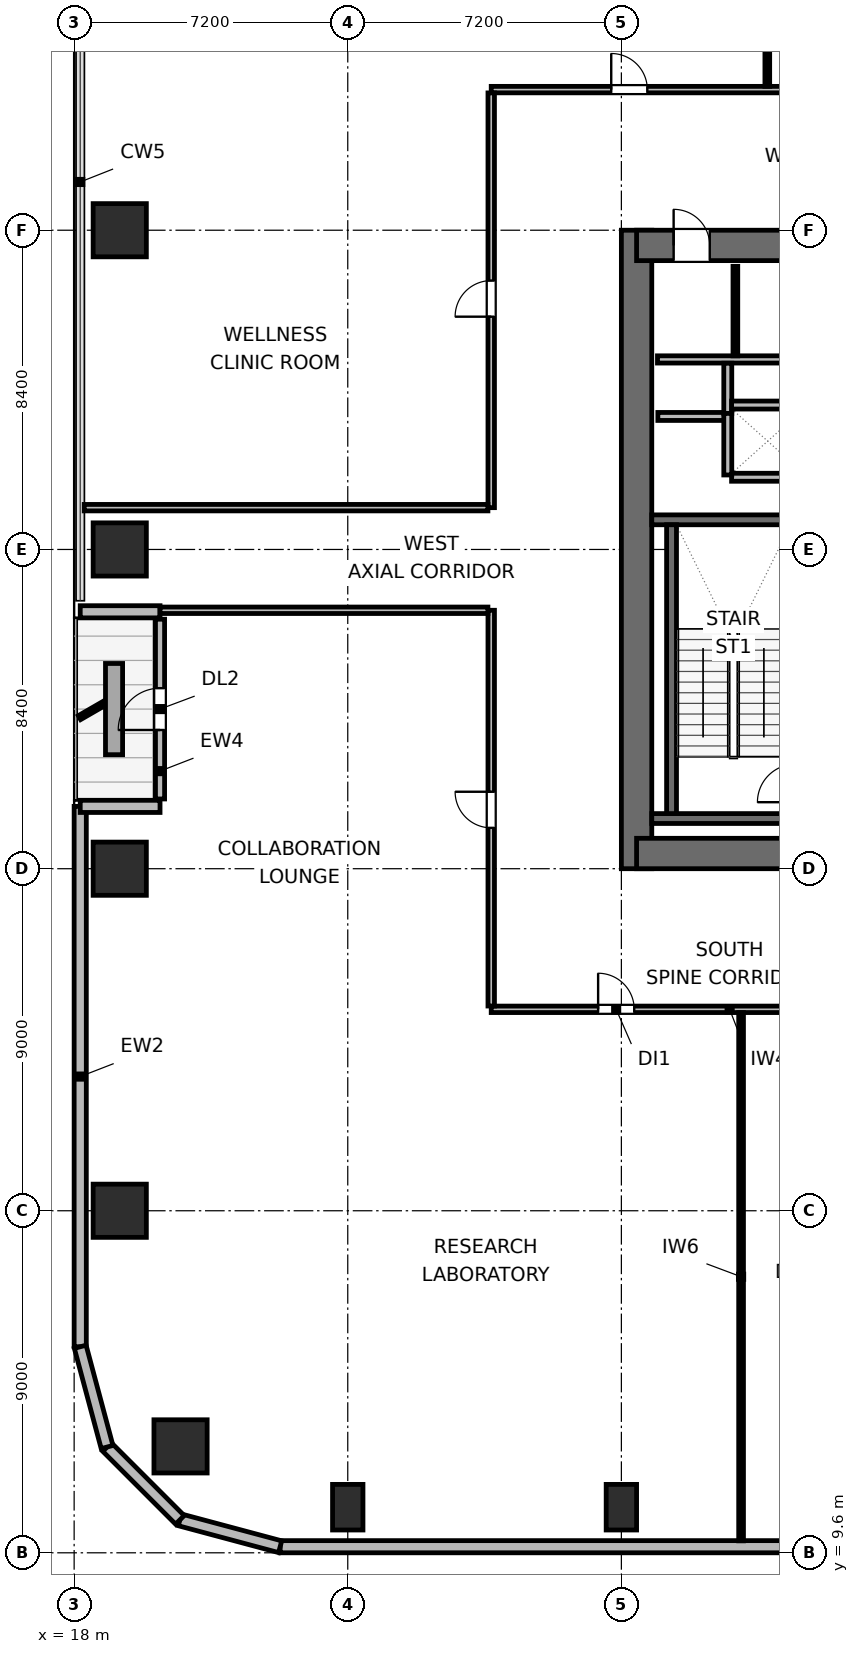
"""IFC4 building model, lengths in metres.
Left out: names, types, materials, properties, quantities, classifications, styles, units other than length and angle.
Written with IfcOpenShell. Run it as: python <this file> out.ifc"""

import sys

from ifc_helpers import new_model, si_unit, direction, frame, frame_2d, origin, origin_2d, place, context, subcontext, project, spatial, rectangle, circle, extrude, element, fill, save


model = new_model("IFC4")
c1 = context("Model", 3, precision=1e-05, world=origin(), true_north=direction((0.0, 1.0)))
c2 = subcontext(c1, "Body", "Model", "MODEL_VIEW")
j1 = project(units=[si_unit("LENGTHUNIT", "METRE"), si_unit("PLANEANGLEUNIT", "RADIAN")], contexts=[c1])
p1 = place(None, origin())
s1 = spatial("IfcSite", under=j1, at=p1, CompositionType="ELEMENT")
p2 = place(p1, origin())
s2 = spatial("IfcBuilding", under=s1, at=p2, CompositionType="ELEMENT")
p3 = place(p2, frame((0.0, 0.0, 125.4)))
s3 = spatial("IfcBuildingStorey", under=s2, at=p3, CompositionType="ELEMENT", Elevation=125.4)
p4 = place(p3, frame((32.8, 27.6, 0.0), z_axis=(0.0, 0.0, 1.0), x_axis=(0.0, 1.0, 0.0)))
e1 = element("IfcWall", 1, at=p4, inside=s3, PredefinedType="SHEAR", context=c2, shape_type="SweptSolid", body=[
    extrude(rectangle(XDim=16.8, YDim=0.8, at=frame_2d((8.4, 0.0))), origin(), (0.0, 0.0, 1.0), 4.5),
])
p5 = place(p3, frame((32.8, 28.0, 0.0), z_axis=(0.0, 0.0, 1.0), x_axis=(1.0, 0.0, 0.0)))
e2 = element("IfcWall", 2, at=p5, inside=s3, PredefinedType="SHEAR", context=c2, shape_type="SweptSolid", body=[
    extrude(rectangle(XDim=9.2, YDim=0.8, at=frame_2d((4.6, 0.0))), origin(), (0.0, 0.0, 1.0), 4.5),
])
p6 = place(p5, frame((4.975, 0.0, 0.0)))
e3 = element("IfcOpeningElement", 3, at=p6, cuts=e2, PredefinedType="OPENING", context=c2, shape_type="SweptSolid", body=[
    extrude(rectangle(XDim=1.05, YDim=2.04, at=frame_2d((0.525, 1.02))), frame((0.0, 0.41, 0.0), z_axis=(0.0, -1.0, 0.0), x_axis=(1.0, 0.0, 0.0)), (0.0, 0.0, 1.0), 0.82),
])
p7 = place(p3, frame((32.8, 44.0, 0.0), z_axis=(0.0, 0.0, 1.0), x_axis=(1.0, 0.0, 0.0)))
e4 = element("IfcWall", 4, at=p7, inside=s3, PredefinedType="SHEAR", context=c2, shape_type="SweptSolid", body=[
    extrude(rectangle(XDim=9.2, YDim=0.8, at=frame_2d((4.6, 0.0))), origin(), (0.0, 0.0, 1.0), 4.5),
])
p8 = place(p7, frame((0.975, 0.0, 0.0)))
e5 = element("IfcOpeningElement", 5, at=p8, cuts=e4, PredefinedType="OPENING", context=c2, shape_type="SweptSolid", body=[
    extrude(rectangle(XDim=0.95, YDim=2.04, at=frame_2d((0.475, 1.02))), frame((0.0, 0.41, 0.0), z_axis=(0.0, -1.0, 0.0), x_axis=(1.0, 0.0, 0.0)), (0.0, 0.0, 1.0), 0.82),
])
p9 = place(p7, frame((4.225, 0.0, 0.0)))
e6 = element("IfcOpeningElement", 6, at=p9, cuts=e4, PredefinedType="OPENING", context=c2, shape_type="SweptSolid", body=[
    extrude(rectangle(XDim=0.9, YDim=2.02, at=frame_2d((0.45, 1.01))), frame((0.0, 0.41, 0.0), z_axis=(0.0, -1.0, 0.0), x_axis=(1.0, 0.0, 0.0)), (0.0, 0.0, 1.0), 0.82),
])
p10 = place(p7, frame((7.125, 0.0, 0.0)))
e7 = element("IfcOpeningElement", 7, at=p10, cuts=e4, PredefinedType="OPENING", context=c2, shape_type="SweptSolid", body=[
    extrude(rectangle(XDim=0.9, YDim=2.02, at=frame_2d((0.45, 1.01))), frame((0.0, 0.41, 0.0), z_axis=(0.0, -1.0, 0.0), x_axis=(1.0, 0.0, 0.0)), (0.0, 0.0, 1.0), 0.82),
])
for number, where, z_axis, x_axis in (
    (8, (33.2, 28.92, 0.0), (0.0, 0.0, 1.0), (1.0, 0.0, 0.0)),
    (9, (33.2, 36.78, 0.0), (0.0, 0.0, 1.0), (1.0, 0.0, 0.0)),
):
    element("IfcWall", number, at=place(p3, frame(where, z_axis=z_axis, x_axis=x_axis)), inside=s3, PredefinedType="SHEAR", context=c2, shape_type="SweptSolid", body=[
        extrude(rectangle(XDim=3.91, YDim=0.26, at=frame_2d((1.955, 0.0))), origin(), (0.0, 0.0, 1.0), 4.5),
    ])
p11 = place(p3, frame((33.72, 29.05, 0.0), z_axis=(0.0, 0.0, 1.0), x_axis=(0.0, 1.0, 0.0)))
e10 = element("IfcWall", 10, at=p11, inside=s3, PredefinedType="SHEAR", context=c2, shape_type="SweptSolid", body=[
    extrude(rectangle(XDim=7.6, YDim=0.26, at=frame_2d((3.8, 0.0))), origin(), (0.0, 0.0, 1.0), 4.5),
])
p12 = place(p3, frame((20.8, 12.4, 0.0), z_axis=(0.0, 0.0, 1.0), x_axis=(1.0, 0.0, 0.0)))
e11 = element("IfcColumn", 11, at=p12, inside=s3, PredefinedType="COLUMN", context=c2, shape_type="SweptSolid", body=[
    extrude(circle(Radius=0.7, at=origin_2d()), origin(), (0.0, 0.0, 1.0), 4.5),
])
for number, where, z_axis, x_axis in (
    (12, (25.2, 10.8, 0.0), (0.0, 0.0, 1.0), (1.0, 0.0, 0.0)),
    (13, (32.4, 10.8, 0.0), (0.0, 0.0, 1.0), (1.0, 0.0, 0.0)),
):
    element("IfcColumn", number, at=place(p3, frame(where, z_axis=z_axis, x_axis=x_axis)), inside=s3, PredefinedType="COLUMN", context=c2, shape_type="SweptSolid", body=[
        extrude(rectangle(XDim=0.8, YDim=1.2, at=origin_2d()), origin(), (0.0, 0.0, 1.0), 4.5),
    ])
for number, where, z_axis, x_axis in (
    (14, (19.2, 18.6, 0.0), (0.0, 0.0, 1.0), (1.0, 0.0, 0.0)),
    (15, (19.2, 27.6, 0.0), (0.0, 0.0, 1.0), (1.0, 0.0, 0.0)),
    (16, (19.2, 36.0, 0.0), (0.0, 0.0, 1.0), (1.0, 0.0, 0.0)),
    (17, (19.2, 44.4, 0.0), (0.0, 0.0, 1.0), (1.0, 0.0, 0.0)),
):
    element("IfcColumn", number, at=place(p3, frame(where, z_axis=z_axis, x_axis=x_axis)), inside=s3, PredefinedType="COLUMN", context=c2, shape_type="SweptSolid", body=[
        extrude(rectangle(XDim=1.4, YDim=1.4, at=origin_2d()), origin(), (0.0, 0.0, 1.0), 4.5),
    ])
p13 = place(p3, frame((18.16, 15.021, 0.0), z_axis=(0.0, 0.0, 1.0), x_axis=(0.0, 1.0, 0.0)))
e18 = element("IfcWall", 18, at=p13, inside=s3, PredefinedType="SOLIDWALL", context=c2, shape_type="SweptSolid", body=[
    extrude(rectangle(XDim=14.219, YDim=0.32, at=frame_2d((7.109, 0.0))), origin(), (0.0, 0.0, 1.0), 4.24),
])
p14 = place(p3, frame((18.16, 29.24, 0.0), z_axis=(0.0, 0.0, 1.0), x_axis=(1.0, 0.0, 0.0)))
e19 = element("IfcWall", 19, at=p14, inside=s3, PredefinedType="SOLIDWALL", context=c2, shape_type="SweptSolid", body=[
    extrude(rectangle(XDim=2.1, YDim=0.32, at=frame_2d((1.05, 0.0))), origin(), (0.0, 0.0, 1.0), 3.475),
])
p15 = place(p3, frame((20.26, 29.435, 0.0), z_axis=(0.0, 0.0, 1.0), x_axis=(0.0, 1.0, 0.0)))
e20 = element("IfcWall", 20, at=p15, inside=s3, PredefinedType="SOLIDWALL", context=c2, shape_type="SweptSolid", body=[
    extrude(rectangle(XDim=4.73, YDim=0.24, at=frame_2d((2.365, 0.0))), origin(), (0.0, 0.0, 1.0), 3.762),
])
p16 = place(p15, frame((1.815, 0.0, 0.0)))
e21 = element("IfcOpeningElement", 21, at=p16, cuts=e20, PredefinedType="OPENING", context=c2, shape_type="SweptSolid", body=[
    extrude(rectangle(XDim=1.1, YDim=2.04, at=frame_2d((0.55, 1.02))), frame((0.0, 0.13, 0.0), z_axis=(0.0, -1.0, 0.0), x_axis=(1.0, 0.0, 0.0)), (0.0, 0.0, 1.0), 0.26),
])
p17 = place(p3, frame((20.26, 34.36, 0.0), z_axis=(0.0, 0.0, 1.0), x_axis=(-1.0, 0.0, 0.0)))
e22 = element("IfcWall", 22, at=p17, inside=s3, PredefinedType="SOLIDWALL", context=c2, shape_type="SweptSolid", body=[
    extrude(rectangle(XDim=2.1, YDim=0.32, at=frame_2d((1.05, 0.0))), origin(), (0.0, 0.0, 1.0), 3.475),
])
p18 = place(p3, frame((41.355, 9.76, 0.0), z_axis=(0.0, 0.0, 1.0), x_axis=(-1.0, 0.0, 0.0)))
e23 = element("IfcWall", 23, at=p18, inside=s3, PredefinedType="SOLIDWALL", context=c2, shape_type="SweptSolid", body=[
    extrude(rectangle(XDim=17.934, YDim=0.32, at=frame_2d((8.967, 0.0))), origin(), (0.0, 0.0, 1.0), 4.24),
])
p19 = place(p3, frame((23.421, 9.76, 0.0), z_axis=(0.0, 0.0, 1.0), x_axis=(-0.965964405026, 0.25867502435, 0.0)))
e24 = element("IfcWall", 24, at=p19, inside=s3, PredefinedType="SOLIDWALL", context=c2, shape_type="SweptSolid", body=[
    extrude(rectangle(XDim=2.731, YDim=0.32, at=frame_2d((1.366, 0.0))), origin(), (0.0, 0.0, 1.0), 4.24),
])
p20 = place(p3, frame((20.783, 10.467, 0.0), z_axis=(0.0, 0.0, 1.0), x_axis=(-0.707106781187, 0.707106781187, 0.0)))
e25 = element("IfcWall", 25, at=p20, inside=s3, PredefinedType="SOLIDWALL", context=c2, shape_type="SweptSolid", body=[
    extrude(rectangle(XDim=2.71, YDim=0.32, at=frame_2d((1.355, 0.0))), origin(), (0.0, 0.0, 1.0), 4.24),
])
p21 = place(p3, frame((18.866, 12.383, 0.0), z_axis=(0.0, 0.0, 1.0), x_axis=(-0.25869736047, 0.965958423373, 0.0)))
e26 = element("IfcWall", 26, at=p21, inside=s3, PredefinedType="SOLIDWALL", context=c2, shape_type="SweptSolid", body=[
    extrude(rectangle(XDim=2.731, YDim=0.32, at=frame_2d((1.366, 0.0))), origin(), (0.0, 0.0, 1.0), 4.24),
])
p22 = place(p3, frame((33.35, 41.0, 0.0), z_axis=(0.0, 0.0, 1.0), x_axis=(1.0, 0.0, 0.0)))
e27 = element("IfcWall", 27, at=p22, inside=s3, PredefinedType="PLUMBINGWALL", context=c2, shape_type="SweptSolid", body=[
    extrude(rectangle(XDim=8.1, YDim=0.19, at=frame_2d((4.05, 0.0))), origin(), (0.0, 0.0, 1.0), 4.24),
])
p23 = place(p3, frame((35.4, 41.095, 0.0), z_axis=(0.0, 0.0, 1.0), x_axis=(0.0, 1.0, 0.0)))
e28 = element("IfcWall", 28, at=p23, inside=s3, PredefinedType="PARTITIONING", context=c2, shape_type="SweptSolid", body=[
    extrude(rectangle(XDim=2.355, YDim=0.125, at=frame_2d((1.177, 0.0))), origin(), (0.0, 0.0, 1.0), 4.24),
])
p24 = place(p3, frame((33.36, 39.5, 0.0), z_axis=(0.0, 0.0, 1.0), x_axis=(1.0, 0.0, 0.0)))
e29 = element("IfcWall", 29, at=p24, inside=s3, PredefinedType="PARTITIONING", context=c2, shape_type="SweptSolid", body=[
    extrude(rectangle(XDim=1.86, YDim=0.21, at=frame_2d((0.93, 0.0))), origin(), (0.0, 0.0, 1.0), 4.24),
])
p25 = place(p3, frame((35.2, 39.58, 0.0), z_axis=(0.0, 0.0, 1.0), x_axis=(0.0, 1.0, 0.0)))
e30 = element("IfcWall", 30, at=p25, inside=s3, PredefinedType="PARTITIONING", context=c2, shape_type="SweptSolid", body=[
    extrude(rectangle(XDim=1.32, YDim=0.21, at=frame_2d((0.66, 0.0))), origin(), (0.0, 0.0, 1.0), 4.24),
])
for number, where, z_axis, x_axis in (
    (31, (35.3, 37.9, 0.0), (0.0, 0.0, 1.0), (1.0, 0.0, 0.0)),
    (32, (35.3, 39.8, 0.0), (0.0, 0.0, 1.0), (1.0, 0.0, 0.0)),
):
    element("IfcWall", number, at=place(p3, frame(where, z_axis=z_axis, x_axis=x_axis)), inside=s3, PredefinedType="PARTITIONING", context=c2, shape_type="SweptSolid", body=[
        extrude(rectangle(XDim=1.9, YDim=0.21, at=frame_2d((0.95, 0.0))), origin(), (0.0, 0.0, 1.0), 4.24),
    ])
p26 = place(p3, frame((35.2, 37.96, 0.0), z_axis=(0.0, 0.0, 1.0), x_axis=(0.0, 1.0, 0.0)))
e33 = element("IfcWall", 33, at=p26, inside=s3, PredefinedType="PARTITIONING", context=c2, shape_type="SweptSolid", body=[
    extrude(rectangle(XDim=1.62, YDim=0.21, at=frame_2d((0.81, 0.0))), origin(), (0.0, 0.0, 1.0), 4.24),
])
p27 = place(p3, frame((28.975, 23.9, 0.0), z_axis=(0.0, 0.0, 1.0), x_axis=(1.0, 0.0, 0.0)))
e34 = element("IfcWall", 34, at=p27, inside=s3, PredefinedType="PARTITIONING", context=c2, shape_type="SweptSolid", body=[
    extrude(rectangle(XDim=34.625, YDim=0.17, at=frame_2d((17.312, 0.0))), origin(), (0.0, 0.0, 1.0), 4.24),
])
p28 = place(p27, frame((2.813, 0.0, 0.0)))
e35 = element("IfcOpeningElement", 35, at=p28, cuts=e34, PredefinedType="OPENING", context=c2, shape_type="SweptSolid", body=[
    extrude(rectangle(XDim=0.95, YDim=2.04, at=frame_2d((0.475, 1.02))), frame((0.0, 0.095, 0.0), z_axis=(0.0, -1.0, 0.0), x_axis=(1.0, 0.0, 0.0)), (0.0, 0.0, 1.0), 0.19),
])
p29 = place(p27, frame((8.785, 0.0, 0.0)))
e36 = element("IfcOpeningElement", 36, at=p29, cuts=e34, PredefinedType="OPENING", context=c2, shape_type="SweptSolid", body=[
    extrude(rectangle(XDim=0.95, YDim=2.04, at=frame_2d((0.475, 1.02))), frame((0.0, 0.095, 0.0), z_axis=(0.0, -1.0, 0.0), x_axis=(1.0, 0.0, 0.0)), (0.0, 0.0, 1.0), 0.19),
])
p30 = place(p27, frame((14.155, 0.0, 0.0)))
e37 = element("IfcOpeningElement", 37, at=p30, cuts=e34, PredefinedType="OPENING", context=c2, shape_type="SweptSolid", body=[
    extrude(rectangle(XDim=0.95, YDim=2.04, at=frame_2d((0.475, 1.02))), frame((0.0, 0.095, 0.0), z_axis=(0.0, -1.0, 0.0), x_axis=(1.0, 0.0, 0.0)), (0.0, 0.0, 1.0), 0.19),
])
p31 = place(p27, frame((19.525, 0.0, 0.0)))
e38 = element("IfcOpeningElement", 38, at=p31, cuts=e34, PredefinedType="OPENING", context=c2, shape_type="SweptSolid", body=[
    extrude(rectangle(XDim=0.95, YDim=2.04, at=frame_2d((0.475, 1.02))), frame((0.0, 0.095, 0.0), z_axis=(0.0, -1.0, 0.0), x_axis=(1.0, 0.0, 0.0)), (0.0, 0.0, 1.0), 0.19),
])
p32 = place(p27, frame((24.895, 0.0, 0.0)))
e39 = element("IfcOpeningElement", 39, at=p32, cuts=e34, PredefinedType="OPENING", context=c2, shape_type="SweptSolid", body=[
    extrude(rectangle(XDim=0.95, YDim=2.04, at=frame_2d((0.475, 1.02))), frame((0.0, 0.095, 0.0), z_axis=(0.0, -1.0, 0.0), x_axis=(1.0, 0.0, 0.0)), (0.0, 0.0, 1.0), 0.19),
])
p33 = place(p27, frame((30.865, 0.0, 0.0)))
e40 = element("IfcOpeningElement", 40, at=p33, cuts=e34, PredefinedType="OPENING", context=c2, shape_type="SweptSolid", body=[
    extrude(rectangle(XDim=0.95, YDim=2.04, at=frame_2d((0.475, 1.02))), frame((0.0, 0.095, 0.0), z_axis=(0.0, -1.0, 0.0), x_axis=(1.0, 0.0, 0.0)), (0.0, 0.0, 1.0), 0.19),
])
p34 = place(p3, frame((28.975, 48.1, 0.0), z_axis=(0.0, 0.0, 1.0), x_axis=(1.0, 0.0, 0.0)))
e41 = element("IfcWall", 41, at=p34, inside=s3, PredefinedType="PARTITIONING", context=c2, shape_type="SweptSolid", body=[
    extrude(rectangle(XDim=34.625, YDim=0.17, at=frame_2d((17.312, 0.0))), origin(), (0.0, 0.0, 1.0), 4.24),
])
p35 = place(p34, frame((3.158, 0.0, 0.0)))
e42 = element("IfcOpeningElement", 42, at=p35, cuts=e41, PredefinedType="OPENING", context=c2, shape_type="SweptSolid", body=[
    extrude(rectangle(XDim=0.95, YDim=2.04, at=frame_2d((0.475, 1.02))), frame((0.0, 0.095, 0.0), z_axis=(0.0, -1.0, 0.0), x_axis=(1.0, 0.0, 0.0)), (0.0, 0.0, 1.0), 0.19),
])
p36 = place(p34, frame((10.505, 0.0, 0.0)))
e43 = element("IfcOpeningElement", 43, at=p36, cuts=e41, PredefinedType="OPENING", context=c2, shape_type="SweptSolid", body=[
    extrude(rectangle(XDim=0.95, YDim=2.04, at=frame_2d((0.475, 1.02))), frame((0.0, 0.095, 0.0), z_axis=(0.0, -1.0, 0.0), x_axis=(1.0, 0.0, 0.0)), (0.0, 0.0, 1.0), 0.19),
])
p37 = place(p34, frame((15.74, 0.0, 0.0)))
e44 = element("IfcOpeningElement", 44, at=p37, cuts=e41, PredefinedType="OPENING", context=c2, shape_type="SweptSolid", body=[
    extrude(rectangle(XDim=0.95, YDim=2.04, at=frame_2d((0.475, 1.02))), frame((0.0, 0.095, 0.0), z_axis=(0.0, -1.0, 0.0), x_axis=(1.0, 0.0, 0.0)), (0.0, 0.0, 1.0), 0.19),
])
p38 = place(p34, frame((22.07, 0.0, 0.0)))
e45 = element("IfcOpeningElement", 45, at=p38, cuts=e41, PredefinedType="OPENING", context=c2, shape_type="SweptSolid", body=[
    extrude(rectangle(XDim=0.95, YDim=2.04, at=frame_2d((0.475, 1.02))), frame((0.0, 0.095, 0.0), z_axis=(0.0, -1.0, 0.0), x_axis=(1.0, 0.0, 0.0)), (0.0, 0.0, 1.0), 0.19),
])
p39 = place(p34, frame((30.515, 0.0, 0.0)))
e46 = element("IfcOpeningElement", 46, at=p39, cuts=e41, PredefinedType="OPENING", context=c2, shape_type="SweptSolid", body=[
    extrude(rectangle(XDim=0.95, YDim=2.04, at=frame_2d((0.475, 1.02))), frame((0.0, 0.095, 0.0), z_axis=(0.0, -1.0, 0.0), x_axis=(1.0, 0.0, 0.0)), (0.0, 0.0, 1.0), 0.19),
])
p40 = place(p3, frame((28.975, 23.987, 0.0), z_axis=(0.0, 0.0, 1.0), x_axis=(0.0, 1.0, 0.0)))
e47 = element("IfcWall", 47, at=p40, inside=s3, PredefinedType="PARTITIONING", context=c2, shape_type="SweptSolid", body=[
    extrude(rectangle(XDim=10.413, YDim=0.17, at=frame_2d((5.207, 0.0))), origin(), (0.0, 0.0, 1.0), 4.24),
])
p41 = place(p40, frame((4.688, 0.0, 0.0)))
e48 = element("IfcOpeningElement", 48, at=p41, cuts=e47, PredefinedType="OPENING", context=c2, shape_type="SweptSolid", body=[
    extrude(rectangle(XDim=0.95, YDim=2.04, at=frame_2d((0.475, 1.02))), frame((0.0, 0.095, 0.0), z_axis=(0.0, -1.0, 0.0), x_axis=(1.0, 0.0, 0.0)), (0.0, 0.0, 1.0), 0.19),
])
p42 = place(p3, frame((28.975, 37.1, 0.0), z_axis=(0.0, 0.0, 1.0), x_axis=(0.0, 1.0, 0.0)))
e49 = element("IfcWall", 49, at=p42, inside=s3, PredefinedType="PARTITIONING", context=c2, shape_type="SweptSolid", body=[
    extrude(rectangle(XDim=10.913, YDim=0.17, at=frame_2d((5.457, 0.0))), origin(), (0.0, 0.0, 1.0), 4.24),
])
p43 = place(p42, frame((5.025, 0.0, 0.0)))
e50 = element("IfcOpeningElement", 50, at=p43, cuts=e49, PredefinedType="OPENING", context=c2, shape_type="SweptSolid", body=[
    extrude(rectangle(XDim=0.95, YDim=2.04, at=frame_2d((0.475, 1.02))), frame((0.0, 0.095, 0.0), z_axis=(0.0, -1.0, 0.0), x_axis=(1.0, 0.0, 0.0)), (0.0, 0.0, 1.0), 0.19),
])
p44 = place(p3, frame((35.55, 9.915, 0.0), z_axis=(0.0, 0.0, 1.0), x_axis=(0.0, 1.0, 0.0)))
e51 = element("IfcWall", 51, at=p44, inside=s3, PredefinedType="PARTITIONING", context=c2, shape_type="SweptSolid", body=[
    extrude(rectangle(XDim=13.898, YDim=0.125, at=frame_2d((6.949, 0.0))), origin(), (0.0, 0.0, 1.0), 4.24),
])
p45 = place(p3, frame((36.24, 48.187, 0.0), z_axis=(0.0, 0.0, 1.0), x_axis=(0.0, 1.0, 0.0)))
e52 = element("IfcWall", 52, at=p45, inside=s3, PredefinedType="PARTITIONING", context=c2, shape_type="SweptSolid", body=[
    extrude(rectangle(XDim=13.948, YDim=0.125, at=frame_2d((6.974, 0.0))), origin(), (0.0, 0.0, 1.0), 4.24),
])
p46 = place(p3, frame((20.26, 34.4, 0.0), z_axis=(0.0, 0.0, 1.0), x_axis=(1.0, 0.0, 0.0)))
e53 = element("IfcWall", 53, at=p46, inside=s3, PredefinedType="PARTITIONING", context=c2, shape_type="SweptSolid", body=[
    extrude(rectangle(XDim=8.628, YDim=0.17, at=frame_2d((4.314, 0.0))), origin(), (0.0, 0.0, 1.0), 4.24),
])
p47 = place(p3, frame((18.265, 37.1, 0.0), z_axis=(0.0, 0.0, 1.0), x_axis=(1.0, 0.0, 0.0)))
e54 = element("IfcWall", 54, at=p47, inside=s3, PredefinedType="PARTITIONING", context=c2, shape_type="SweptSolid", body=[
    extrude(rectangle(XDim=10.623, YDim=0.17, at=frame_2d((5.312, 0.0))), origin(), (0.0, 0.0, 1.0), 4.24),
])
p48 = place(p16, origin())
e55 = element("IfcDoor", 55, at=p48, inside=s3, OperationType="SINGLE_SWING_LEFT", PredefinedType="DOOR", context=c2, shape_type="SweptSolid", body=[
    extrude(rectangle(XDim=1.1, YDim=2.04, at=frame_2d((0.55, 1.02))), frame((0.0, 0.025, 0.0), z_axis=(0.0, -1.0, 0.0), x_axis=(1.0, 0.0, 0.0)), (0.0, 0.0, 1.0), 0.05),
])
fill(e21, e55)
p49 = place(p8, origin())
e56 = element("IfcDoor", 56, at=p49, inside=s3, OperationType="SINGLE_SWING_LEFT", PredefinedType="DOOR", context=c2, shape_type="SweptSolid", body=[
    extrude(rectangle(XDim=0.95, YDim=2.04, at=frame_2d((0.475, 1.02))), frame((0.0, 0.025, 0.0), z_axis=(0.0, -1.0, 0.0), x_axis=(1.0, 0.0, 0.0)), (0.0, 0.0, 1.0), 0.05),
])
fill(e5, e56)
p50 = place(p28, origin())
e57 = element("IfcDoor", 57, at=p50, inside=s3, OperationType="SINGLE_SWING_LEFT", PredefinedType="DOOR", context=c2, shape_type="SweptSolid", body=[
    extrude(rectangle(XDim=0.95, YDim=2.04, at=frame_2d((0.475, 1.02))), frame((0.0, 0.025, 0.0), z_axis=(0.0, -1.0, 0.0), x_axis=(1.0, 0.0, 0.0)), (0.0, 0.0, 1.0), 0.05),
])
fill(e35, e57)
p51 = place(p35, origin())
e58 = element("IfcDoor", 58, at=p51, inside=s3, OperationType="SINGLE_SWING_LEFT", PredefinedType="DOOR", context=c2, shape_type="SweptSolid", body=[
    extrude(rectangle(XDim=0.95, YDim=2.04, at=frame_2d((0.475, 1.02))), frame((0.0, 0.025, 0.0), z_axis=(0.0, -1.0, 0.0), x_axis=(1.0, 0.0, 0.0)), (0.0, 0.0, 1.0), 0.05),
])
fill(e42, e58)
p52 = place(p41, origin())
e59 = element("IfcDoor", 59, at=p52, inside=s3, OperationType="SINGLE_SWING_RIGHT", PredefinedType="DOOR", context=c2, shape_type="SweptSolid", body=[
    extrude(rectangle(XDim=0.95, YDim=2.04, at=frame_2d((0.475, 1.02))), frame((0.0, 0.025, 0.0), z_axis=(0.0, -1.0, 0.0), x_axis=(1.0, 0.0, 0.0)), (0.0, 0.0, 1.0), 0.05),
])
fill(e48, e59)
p53 = place(p43, origin())
e60 = element("IfcDoor", 60, at=p53, inside=s3, OperationType="SINGLE_SWING_LEFT", PredefinedType="DOOR", context=c2, shape_type="SweptSolid", body=[
    extrude(rectangle(XDim=0.95, YDim=2.04, at=frame_2d((0.475, 1.02))), frame((0.0, 0.025, 0.0), z_axis=(0.0, -1.0, 0.0), x_axis=(1.0, 0.0, 0.0)), (0.0, 0.0, 1.0), 0.05),
])
fill(e50, e60)
save(model, sys.argv[1])
